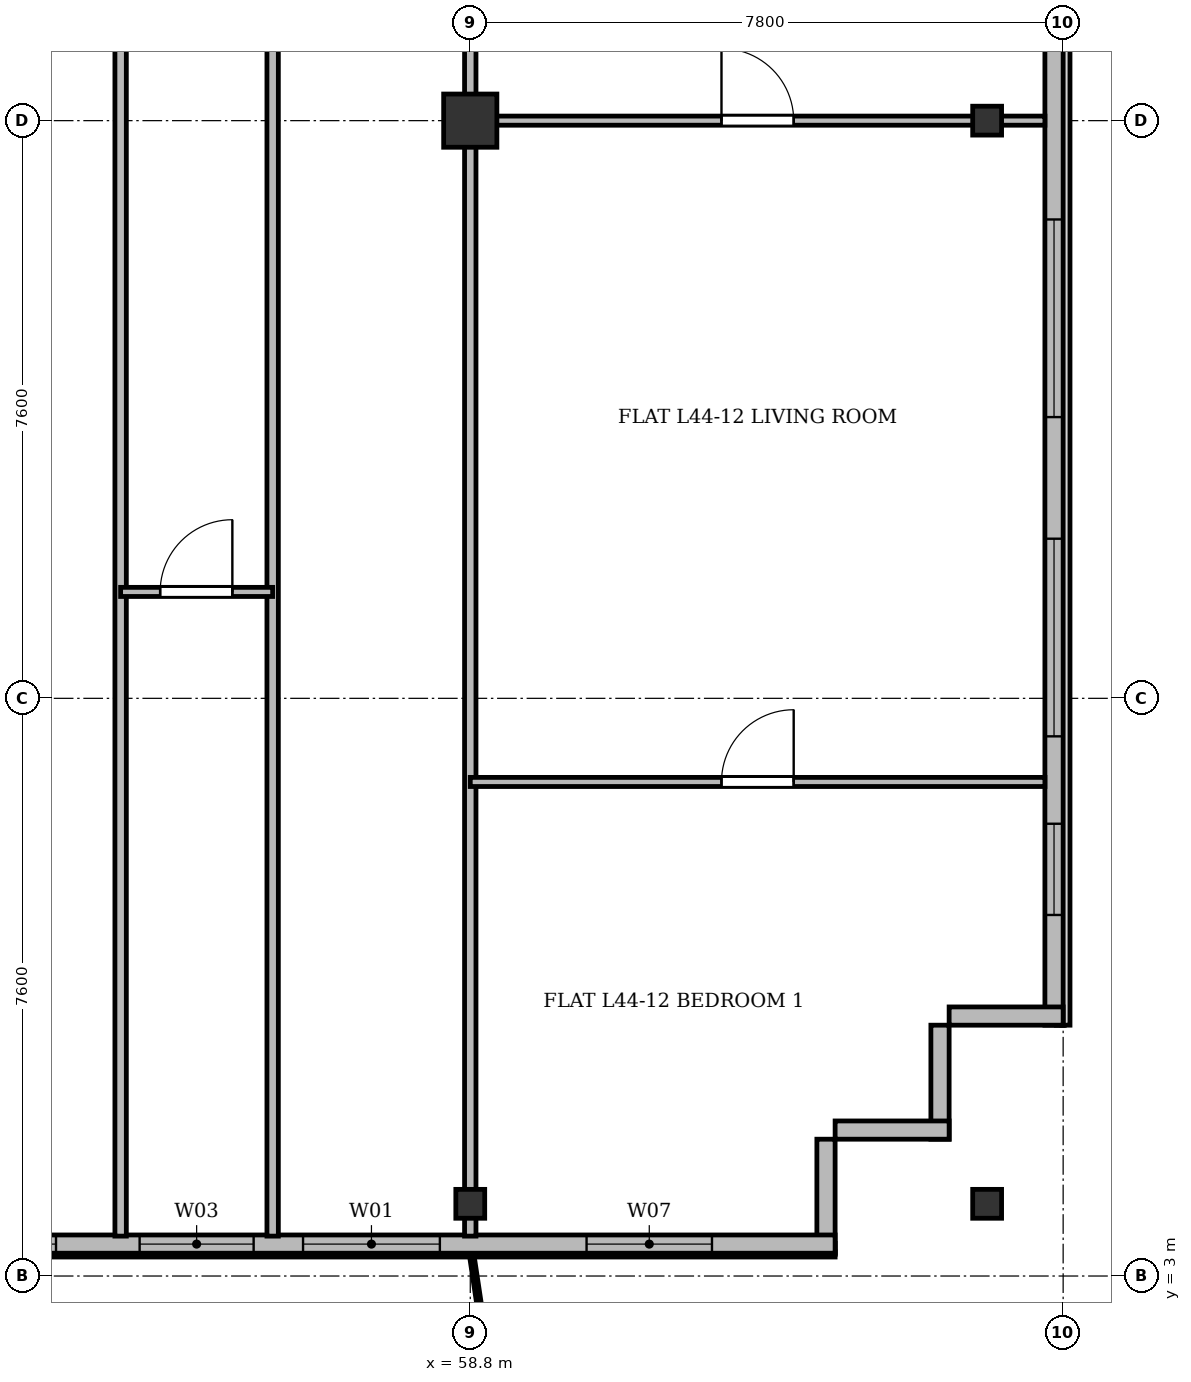
"""IFC4 building model, lengths in metres.
Left out: names, types, materials, properties, quantities, classifications, styles, units other than length and angle.
Written with IfcOpenShell. Run it as: python <this file> out.ifc"""

import sys

from ifc_helpers import new_model, si_unit, direction, frame, frame_2d, origin, origin_2d, place, context, subcontext, project, spatial, rectangle, i_section, extrude, source, transform, mapped, element, fill, save


model = new_model("IFC4")
c1 = context("Model", 3, precision=1e-05, world=origin(), true_north=direction((0.0, 1.0)))
c2 = subcontext(c1, "Body", "Model", "MODEL_VIEW")
j1 = project(units=[si_unit("LENGTHUNIT", "METRE"), si_unit("PLANEANGLEUNIT", "RADIAN")], contexts=[c1])
p1 = place(None, origin())
s1 = spatial("IfcSite", under=j1, at=p1, CompositionType="ELEMENT")
p2 = place(p1, origin())
s2 = spatial("IfcBuilding", under=s1, at=p2, CompositionType="ELEMENT")
p3 = place(p2, frame((0.0, 0.0, 168.1)))
s3 = spatial("IfcBuildingStorey", under=s2, at=p3, CompositionType="ELEMENT", Elevation=168.1)
m1 = source(origin(), c2, "Body", "SweptSolid", [
    extrude(i_section(OverallWidth=0.38, OverallDepth=0.38, WebThickness=0.02, FlangeThickness=0.03, at=origin_2d()), origin(), (0.0, 0.0, 1.0), 3.6),
])
p4 = place(p3, frame((58.8, 3.95, 0.0), z_axis=(0.0, 0.0, 1.0), x_axis=(1.0, 0.0, 0.0)))
e1 = element("IfcColumn", 1, at=p4, inside=s3, PredefinedType="COLUMN", context=c2, shape_type="MappedRepresentation", body=[
    mapped(m1, transform((0.0, 0.0, 0.0), x_axis=(1.0, 0.0, 0.0), y_axis=(0.0, 1.0, 0.0), z_axis=(0.0, 0.0, 1.0), scale=1.0)),
])
m2 = source(origin(), c2, "Body", "SweptSolid", [
    extrude(rectangle(XDim=0.7, YDim=0.7, at=origin_2d()), origin(), (0.0, 0.0, 1.0), 3.6),
])
p5 = place(p3, frame((58.8, 18.2, 0.0), z_axis=(0.0, 0.0, 1.0), x_axis=(1.0, 0.0, 0.0)))
e2 = element("IfcColumn", 2, at=p5, inside=s3, PredefinedType="COLUMN", context=c2, shape_type="MappedRepresentation", body=[
    mapped(m2, transform((0.0, 0.0, 0.0), x_axis=(1.0, 0.0, 0.0), y_axis=(0.0, 1.0, 0.0), z_axis=(0.0, 0.0, 1.0), scale=1.0)),
])
for number, where, z_axis, x_axis in (
    (3, (65.6, 3.95, 0.0), (0.0, 0.0, 1.0), (1.0, 0.0, 0.0)),
    (4, (65.6, 18.2, 0.0), (0.0, 0.0, 1.0), (1.0, 0.0, 0.0)),
):
    element("IfcColumn", number, at=place(p3, frame(where, z_axis=z_axis, x_axis=x_axis)), inside=s3, PredefinedType="COLUMN", context=c2, shape_type="MappedRepresentation", body=[
        mapped(m1, transform((0.0, 0.0, 0.0), x_axis=(1.0, 0.0, 0.0), y_axis=(0.0, 1.0, 0.0), z_axis=(0.0, 0.0, 1.0), scale=1.0)),
    ])
p6 = place(p3, frame((66.48, 45.5, 0.0), z_axis=(0.0, 0.0, 1.0), x_axis=(0.0, -1.0, 0.0)))
e5 = element("IfcWall", 5, at=p6, inside=s3, PredefinedType="SOLIDWALL", context=c2, shape_type="SweptSolid", body=[
    extrude(rectangle(XDim=39.2, YDim=0.24, at=frame_2d((19.6, 0.0))), origin(), (0.0, 0.0, 1.0), 3.35),
])
p7 = place(p6, frame((36.55, 0.0, 0.92)))
e6 = element("IfcOpeningElement", 6, at=p7, cuts=e5, PredefinedType="OPENING", context=c2, shape_type="SweptSolid", body=[
    extrude(rectangle(XDim=1.2, YDim=1.65, at=frame_2d((0.6, 0.825))), frame((0.0, 0.13, 0.0), z_axis=(0.0, -1.0, 0.0), x_axis=(1.0, 0.0, 0.0)), (0.0, 0.0, 1.0), 0.26),
])
p8 = place(p6, frame((32.8, 0.0, 0.92)))
e7 = element("IfcOpeningElement", 7, at=p8, cuts=e5, PredefinedType="OPENING", context=c2, shape_type="SweptSolid", body=[
    extrude(rectangle(XDim=2.6, YDim=1.9, at=frame_2d((1.3, 0.95))), frame((0.0, 0.13, 0.0), z_axis=(0.0, -1.0, 0.0), x_axis=(1.0, 0.0, 0.0)), (0.0, 0.0, 1.0), 0.26),
])
p9 = place(p6, frame((28.6, 0.0, 0.92)))
e8 = element("IfcOpeningElement", 8, at=p9, cuts=e5, PredefinedType="OPENING", context=c2, shape_type="SweptSolid", body=[
    extrude(rectangle(XDim=2.6, YDim=1.9, at=frame_2d((1.3, 0.95))), frame((0.0, 0.13, 0.0), z_axis=(0.0, -1.0, 0.0), x_axis=(1.0, 0.0, 0.0)), (0.0, 0.0, 1.0), 0.26),
])
p10 = place(p6, frame((21.4, 0.0, 0.92)))
e9 = element("IfcOpeningElement", 9, at=p10, cuts=e5, PredefinedType="OPENING", context=c2, shape_type="SweptSolid", body=[
    extrude(rectangle(XDim=2.6, YDim=1.9, at=frame_2d((1.3, 0.95))), frame((0.0, 0.13, 0.0), z_axis=(0.0, -1.0, 0.0), x_axis=(1.0, 0.0, 0.0)), (0.0, 0.0, 1.0), 0.26),
])
p11 = place(p6, frame((7.4, 0.0, 0.92)))
e10 = element("IfcOpeningElement", 10, at=p11, cuts=e5, PredefinedType="OPENING", context=c2, shape_type="SweptSolid", body=[
    extrude(rectangle(XDim=2.6, YDim=1.9, at=frame_2d((1.3, 0.95))), frame((0.0, 0.13, 0.0), z_axis=(0.0, -1.0, 0.0), x_axis=(1.0, 0.0, 0.0)), (0.0, 0.0, 1.0), 0.26),
])
p12 = place(p6, frame((1.15, 0.0, 0.92)))
e11 = element("IfcOpeningElement", 11, at=p12, cuts=e5, PredefinedType="OPENING", context=c2, shape_type="SweptSolid", body=[
    extrude(rectangle(XDim=1.2, YDim=1.65, at=frame_2d((0.6, 0.825))), frame((0.0, 0.13, 0.0), z_axis=(0.0, -1.0, 0.0), x_axis=(1.0, 0.0, 0.0)), (0.0, 0.0, 1.0), 0.26),
])
p13 = place(p3, frame((66.6, 6.42, 0.0), z_axis=(0.0, 0.0, 1.0), x_axis=(-1.0, 0.0, 0.0)))
e12 = element("IfcWall", 12, at=p13, inside=s3, PredefinedType="SOLIDWALL", context=c2, shape_type="SweptSolid", body=[
    extrude(rectangle(XDim=1.5, YDim=0.24, at=frame_2d((0.75, 0.0))), origin(), (0.0, 0.0, 1.0), 2.85),
])
for number, where, z_axis, x_axis in (
    (13, (64.98, 6.3, 0.0), (0.0, 0.0, 1.0), (0.0, -1.0, 0.0)),
    (14, (65.1, 4.92, 0.0), (0.0, 0.0, 1.0), (-1.0, 0.0, 0.0)),
):
    element("IfcWall", number, at=place(p3, frame(where, z_axis=z_axis, x_axis=x_axis)), inside=s3, PredefinedType="SOLIDWALL", context=c2, shape_type="SweptSolid", body=[
        extrude(rectangle(XDim=1.5, YDim=0.24, at=frame_2d((0.75, 0.0))), origin(), (0.0, 0.0, 1.0), 3.35),
    ])
p14 = place(p3, frame((63.48, 4.8, 0.0), z_axis=(0.0, 0.0, 1.0), x_axis=(0.0, -1.0, 0.0)))
e15 = element("IfcWall", 15, at=p14, inside=s3, PredefinedType="SOLIDWALL", context=c2, shape_type="SweptSolid", body=[
    extrude(rectangle(XDim=1.5, YDim=0.24, at=frame_2d((0.75, 0.0))), origin(), (0.0, 0.0, 1.0), 2.75),
])
p15 = place(p3, frame((63.6, 3.42, 0.0), z_axis=(0.0, 0.0, 1.0), x_axis=(-1.0, 0.0, 0.0)))
e16 = element("IfcWall", 16, at=p15, inside=s3, PredefinedType="SOLIDWALL", context=c2, shape_type="SweptSolid", body=[
    extrude(rectangle(XDim=52.8, YDim=0.24, at=frame_2d((26.4, 0.0))), origin(), (0.0, 0.0, 1.0), 3.35),
])
p16 = place(p15, frame((1.62, 0.0, 0.9)))
e17 = element("IfcOpeningElement", 17, at=p16, cuts=e16, PredefinedType="OPENING", context=c2, shape_type="SweptSolid", body=[
    extrude(rectangle(XDim=1.65, YDim=1.85, at=frame_2d((0.825, 0.925))), frame((0.0, 0.13, 0.0), z_axis=(0.0, -1.0, 0.0), x_axis=(1.0, 0.0, 0.0)), (0.0, 0.0, 1.0), 0.26),
])
p17 = place(p15, frame((5.2, 0.0, 0.9)))
e18 = element("IfcOpeningElement", 18, at=p17, cuts=e16, PredefinedType="OPENING", context=c2, shape_type="SweptSolid", body=[
    extrude(rectangle(XDim=1.8, YDim=1.8, at=frame_2d((0.9, 0.9))), frame((0.0, 0.13, 0.0), z_axis=(0.0, -1.0, 0.0), x_axis=(1.0, 0.0, 0.0)), (0.0, 0.0, 1.0), 0.26),
])
p18 = place(p15, frame((7.65, 0.0, 0.9)))
e19 = element("IfcOpeningElement", 19, at=p18, cuts=e16, PredefinedType="OPENING", context=c2, shape_type="SweptSolid", body=[
    extrude(rectangle(XDim=1.5, YDim=1.75, at=frame_2d((0.75, 0.875))), frame((0.0, 0.13, 0.0), z_axis=(0.0, -1.0, 0.0), x_axis=(1.0, 0.0, 0.0)), (0.0, 0.0, 1.0), 0.26),
])
p19 = place(p15, frame((10.25, 0.0, 0.9)))
e20 = element("IfcOpeningElement", 20, at=p19, cuts=e16, PredefinedType="OPENING", context=c2, shape_type="SweptSolid", body=[
    extrude(rectangle(XDim=1.5, YDim=1.75, at=frame_2d((0.75, 0.875))), frame((0.0, 0.13, 0.0), z_axis=(0.0, -1.0, 0.0), x_axis=(1.0, 0.0, 0.0)), (0.0, 0.0, 1.0), 0.26),
])
p20 = place(p15, frame((13.62, 0.0, 0.0)))
e21 = element("IfcOpeningElement", 21, at=p20, cuts=e16, PredefinedType="OPENING", context=c2, shape_type="SweptSolid", body=[
    extrude(rectangle(XDim=1.2, YDim=2.2, at=frame_2d((0.6, 1.1))), frame((0.0, 0.13, 0.0), z_axis=(0.0, -1.0, 0.0), x_axis=(1.0, 0.0, 0.0)), (0.0, 0.0, 1.0), 0.26),
])
p21 = place(p15, frame((15.375, 0.0, 0.9)))
e22 = element("IfcOpeningElement", 22, at=p21, cuts=e16, PredefinedType="OPENING", context=c2, shape_type="SweptSolid", body=[
    extrude(rectangle(XDim=1.65, YDim=1.85, at=frame_2d((0.825, 0.925))), frame((0.0, 0.13, 0.0), z_axis=(0.0, -1.0, 0.0), x_axis=(1.0, 0.0, 0.0)), (0.0, 0.0, 1.0), 0.26),
])
p22 = place(p15, frame((17.7, 0.0, 0.9)))
e23 = element("IfcOpeningElement", 23, at=p22, cuts=e16, PredefinedType="OPENING", context=c2, shape_type="SweptSolid", body=[
    extrude(rectangle(XDim=1.8, YDim=1.8, at=frame_2d((0.9, 0.9))), frame((0.0, 0.13, 0.0), z_axis=(0.0, -1.0, 0.0), x_axis=(1.0, 0.0, 0.0)), (0.0, 0.0, 1.0), 0.26),
])
p23 = place(p15, frame((22.0, 0.0, 0.9)))
e24 = element("IfcOpeningElement", 24, at=p23, cuts=e16, PredefinedType="OPENING", context=c2, shape_type="SweptSolid", body=[
    extrude(rectangle(XDim=2.2, YDim=1.8, at=frame_2d((1.1, 0.9))), frame((0.0, 0.13, 0.0), z_axis=(0.0, -1.0, 0.0), x_axis=(1.0, 0.0, 0.0)), (0.0, 0.0, 1.0), 0.26),
])
p24 = place(p15, frame((28.95, 0.0, 0.9)))
e25 = element("IfcOpeningElement", 25, at=p24, cuts=e16, PredefinedType="OPENING", context=c2, shape_type="SweptSolid", body=[
    extrude(rectangle(XDim=1.5, YDim=1.75, at=frame_2d((0.75, 0.875))), frame((0.0, 0.13, 0.0), z_axis=(0.0, -1.0, 0.0), x_axis=(1.0, 0.0, 0.0)), (0.0, 0.0, 1.0), 0.26),
])
p25 = place(p15, frame((35.6, 0.0, 0.9)))
e26 = element("IfcOpeningElement", 26, at=p25, cuts=e16, PredefinedType="OPENING", context=c2, shape_type="SweptSolid", body=[
    extrude(rectangle(XDim=2.0, YDim=1.95, at=frame_2d((1.0, 0.975))), frame((0.0, 0.13, 0.0), z_axis=(0.0, -1.0, 0.0), x_axis=(1.0, 0.0, 0.0)), (0.0, 0.0, 1.0), 0.26),
])
p26 = place(p15, frame((41.656, 0.0, 0.0)))
e27 = element("IfcOpeningElement", 27, at=p26, cuts=e16, PredefinedType="OPENING", context=c2, shape_type="SweptSolid", body=[
    extrude(rectangle(XDim=1.2, YDim=2.2, at=frame_2d((0.6, 1.1))), frame((0.0, 0.13, 0.0), z_axis=(0.0, -1.0, 0.0), x_axis=(1.0, 0.0, 0.0)), (0.0, 0.0, 1.0), 0.26),
])
p27 = place(p15, frame((43.65, 0.0, 0.9)))
e28 = element("IfcOpeningElement", 28, at=p27, cuts=e16, PredefinedType="OPENING", context=c2, shape_type="SweptSolid", body=[
    extrude(rectangle(XDim=1.5, YDim=1.75, at=frame_2d((0.75, 0.875))), frame((0.0, 0.13, 0.0), z_axis=(0.0, -1.0, 0.0), x_axis=(1.0, 0.0, 0.0)), (0.0, 0.0, 1.0), 0.26),
])
p28 = place(p15, frame((45.95, 0.0, 0.9)))
e29 = element("IfcOpeningElement", 29, at=p28, cuts=e16, PredefinedType="OPENING", context=c2, shape_type="SweptSolid", body=[
    extrude(rectangle(XDim=1.5, YDim=1.75, at=frame_2d((0.75, 0.875))), frame((0.0, 0.13, 0.0), z_axis=(0.0, -1.0, 0.0), x_axis=(1.0, 0.0, 0.0)), (0.0, 0.0, 1.0), 0.26),
])
p29 = place(p15, frame((49.605, 0.0, 0.9)))
e30 = element("IfcOpeningElement", 30, at=p29, cuts=e16, PredefinedType="OPENING", context=c2, shape_type="SweptSolid", body=[
    extrude(rectangle(XDim=1.5, YDim=1.75, at=frame_2d((0.75, 0.875))), frame((0.0, 0.13, 0.0), z_axis=(0.0, -1.0, 0.0), x_axis=(1.0, 0.0, 0.0)), (0.0, 0.0, 1.0), 0.26),
])
p30 = place(p3, frame((58.8, 3.525, 0.0), z_axis=(0.0, 0.0, 1.0), x_axis=(0.0, 1.0, 0.0)))
e31 = element("IfcWall", 31, at=p30, inside=s3, PredefinedType="PARTITIONING", context=c2, shape_type="SweptSolid", body=[
    extrude(rectangle(XDim=27.275, YDim=0.15, at=frame_2d((13.638, 0.0))), origin(), (0.0, 0.0, 1.0), 2.85),
])
for number, where, z_axis, x_axis in (
    (32, (54.2, 3.525, 0.0), (0.0, 0.0, 1.0), (0.0, 1.0, 0.0)),
    (33, (56.2, 3.525, 0.0), (0.0, 0.0, 1.0), (0.0, 1.0, 0.0)),
):
    element("IfcWall", number, at=place(p3, frame(where, z_axis=z_axis, x_axis=x_axis)), inside=s3, PredefinedType="PARTITIONING", context=c2, shape_type="SweptSolid", body=[
        extrude(rectangle(XDim=27.275, YDim=0.15, at=frame_2d((13.638, 0.0))), origin(), (0.0, 0.0, 1.0), 2.75),
    ])
p31 = place(p3, frame((54.2, 12.0, 0.0), z_axis=(0.0, 0.0, 1.0), x_axis=(1.0, 0.0, 0.0)))
e34 = element("IfcWall", 34, at=p31, inside=s3, PredefinedType="PARTITIONING", context=c2, shape_type="SweptSolid", body=[
    extrude(rectangle(XDim=2.0, YDim=0.12, at=frame_2d((1.0, 0.0))), origin(), (0.0, 0.0, 1.0), 3.35),
])
p32 = place(p31, frame((0.52, 0.0, 0.0)))
e35 = element("IfcOpeningElement", 35, at=p32, cuts=e34, PredefinedType="OPENING", context=c2, shape_type="SweptSolid", body=[
    extrude(rectangle(XDim=0.95, YDim=2.15, at=frame_2d((0.475, 1.075))), frame((0.0, 0.07, 0.0), z_axis=(0.0, -1.0, 0.0), x_axis=(1.0, 0.0, 0.0)), (0.0, 0.0, 1.0), 0.14),
])
p33 = place(p3, frame((58.8, 18.2, 0.0), z_axis=(0.0, 0.0, 1.0), x_axis=(1.0, 0.0, 0.0)))
e36 = element("IfcWall", 36, at=p33, inside=s3, PredefinedType="PARTITIONING", context=c2, shape_type="SweptSolid", body=[
    extrude(rectangle(XDim=7.56, YDim=0.12, at=frame_2d((3.78, 0.0))), origin(), (0.0, 0.0, 1.0), 2.75),
])
p34 = place(p33, frame((3.305, 0.0, 0.0)))
e37 = element("IfcOpeningElement", 37, at=p34, cuts=e36, PredefinedType="OPENING", context=c2, shape_type="SweptSolid", body=[
    extrude(rectangle(XDim=0.95, YDim=2.15, at=frame_2d((0.475, 1.075))), frame((0.0, 0.07, 0.0), z_axis=(0.0, -1.0, 0.0), x_axis=(1.0, 0.0, 0.0)), (0.0, 0.0, 1.0), 0.14),
])
p35 = place(p3, frame((58.8, 9.5, 0.0), z_axis=(0.0, 0.0, 1.0), x_axis=(1.0, 0.0, 0.0)))
e38 = element("IfcWall", 38, at=p35, inside=s3, PredefinedType="PARTITIONING", context=c2, shape_type="SweptSolid", body=[
    extrude(rectangle(XDim=7.56, YDim=0.12, at=frame_2d((3.78, 0.0))), origin(), (0.0, 0.0, 1.0), 2.85),
])
p36 = place(p35, frame((3.305, 0.0, 0.0)))
e39 = element("IfcOpeningElement", 39, at=p36, cuts=e38, PredefinedType="OPENING", context=c2, shape_type="SweptSolid", body=[
    extrude(rectangle(XDim=0.95, YDim=2.15, at=frame_2d((0.475, 1.075))), frame((0.0, 0.07, 0.0), z_axis=(0.0, -1.0, 0.0), x_axis=(1.0, 0.0, 0.0)), (0.0, 0.0, 1.0), 0.14),
])
m3 = source(origin(), c2, "Body", "SweptSolid", [
    extrude(rectangle(XDim=1.2, YDim=1.65, at=frame_2d((0.6, 0.825))), frame((0.0, 0.03, 0.0), z_axis=(0.0, -1.0, 0.0), x_axis=(1.0, 0.0, 0.0)), (0.0, 0.0, 1.0), 0.06),
])
p37 = place(p7, origin())
e40 = element("IfcWindow", 40, at=p37, inside=s3, PartitioningType="SINGLE_PANEL", PredefinedType="WINDOW", context=c2, shape_type="MappedRepresentation", body=[
    mapped(m3, transform((0.0, 0.0, 0.0), x_axis=(1.0, 0.0, 0.0), y_axis=(0.0, 1.0, 0.0), z_axis=(0.0, 0.0, 1.0), scale=1.0)),
])
fill(e6, e40)
m4 = source(origin(), c2, "Body", "SweptSolid", [
    extrude(rectangle(XDim=2.6, YDim=1.9, at=frame_2d((1.3, 0.95))), frame((0.0, 0.03, 0.0), z_axis=(0.0, -1.0, 0.0), x_axis=(1.0, 0.0, 0.0)), (0.0, 0.0, 1.0), 0.06),
])
p38 = place(p8, origin())
e41 = element("IfcWindow", 41, at=p38, inside=s3, PartitioningType="SINGLE_PANEL", PredefinedType="WINDOW", context=c2, shape_type="MappedRepresentation", body=[
    mapped(m4, transform((0.0, 0.0, 0.0), x_axis=(1.0, 0.0, 0.0), y_axis=(0.0, 1.0, 0.0), z_axis=(0.0, 0.0, 1.0), scale=1.0)),
])
fill(e7, e41)
p39 = place(p9, origin())
e42 = element("IfcWindow", 42, at=p39, inside=s3, PartitioningType="SINGLE_PANEL", PredefinedType="WINDOW", context=c2, shape_type="MappedRepresentation", body=[
    mapped(m4, transform((0.0, 0.0, 0.0), x_axis=(1.0, 0.0, 0.0), y_axis=(0.0, 1.0, 0.0), z_axis=(0.0, 0.0, 1.0), scale=1.0)),
])
fill(e8, e42)
m5 = source(origin(), c2, "Body", "SweptSolid", [
    extrude(rectangle(XDim=1.65, YDim=1.85, at=frame_2d((0.825, 0.925))), frame((0.0, 0.03, 0.0), z_axis=(0.0, -1.0, 0.0), x_axis=(1.0, 0.0, 0.0)), (0.0, 0.0, 1.0), 0.06),
])
p40 = place(p16, origin())
e43 = element("IfcWindow", 43, at=p40, inside=s3, PartitioningType="SINGLE_PANEL", PredefinedType="WINDOW", context=c2, shape_type="MappedRepresentation", body=[
    mapped(m5, transform((0.0, 0.0, 0.0), x_axis=(1.0, 0.0, 0.0), y_axis=(0.0, 1.0, 0.0), z_axis=(0.0, 0.0, 1.0), scale=1.0)),
])
fill(e17, e43)
m6 = source(origin(), c2, "Body", "SweptSolid", [
    extrude(rectangle(XDim=1.8, YDim=1.8, at=frame_2d((0.9, 0.9))), frame((0.0, 0.03, 0.0), z_axis=(0.0, -1.0, 0.0), x_axis=(1.0, 0.0, 0.0)), (0.0, 0.0, 1.0), 0.06),
])
p41 = place(p17, origin())
e44 = element("IfcWindow", 44, at=p41, inside=s3, PartitioningType="SINGLE_PANEL", PredefinedType="WINDOW", context=c2, shape_type="MappedRepresentation", body=[
    mapped(m6, transform((0.0, 0.0, 0.0), x_axis=(1.0, 0.0, 0.0), y_axis=(0.0, 1.0, 0.0), z_axis=(0.0, 0.0, 1.0), scale=1.0)),
])
fill(e18, e44)
m7 = source(origin(), c2, "Body", "SweptSolid", [
    extrude(rectangle(XDim=1.5, YDim=1.75, at=frame_2d((0.75, 0.875))), frame((0.0, 0.03, 0.0), z_axis=(0.0, -1.0, 0.0), x_axis=(1.0, 0.0, 0.0)), (0.0, 0.0, 1.0), 0.06),
])
p42 = place(p18, origin())
e45 = element("IfcWindow", 45, at=p42, inside=s3, PartitioningType="SINGLE_PANEL", PredefinedType="WINDOW", context=c2, shape_type="MappedRepresentation", body=[
    mapped(m7, transform((0.0, 0.0, 0.0), x_axis=(1.0, 0.0, 0.0), y_axis=(0.0, 1.0, 0.0), z_axis=(0.0, 0.0, 1.0), scale=1.0)),
])
fill(e19, e45)
p43 = place(p19, origin())
e46 = element("IfcWindow", 46, at=p43, inside=s3, PartitioningType="SINGLE_PANEL", PredefinedType="WINDOW", context=c2, shape_type="MappedRepresentation", body=[
    mapped(m7, transform((0.0, 0.0, 0.0), x_axis=(1.0, 0.0, 0.0), y_axis=(0.0, 1.0, 0.0), z_axis=(0.0, 0.0, 1.0), scale=1.0)),
])
fill(e20, e46)
m8 = source(origin(), c2, "Body", "SweptSolid", [
    extrude(rectangle(XDim=0.95, YDim=2.15, at=frame_2d((0.475, 1.075))), frame((0.0, 0.025, 0.0), z_axis=(0.0, -1.0, 0.0), x_axis=(1.0, 0.0, 0.0)), (0.0, 0.0, 1.0), 0.05),
])
p44 = place(p32, origin())
e47 = element("IfcDoor", 47, at=p44, inside=s3, OperationType="SINGLE_SWING_RIGHT", PredefinedType="DOOR", context=c2, shape_type="MappedRepresentation", body=[
    mapped(m8, transform((0.0, 0.0, 0.0), x_axis=(1.0, 0.0, 0.0), y_axis=(0.0, 1.0, 0.0), z_axis=(0.0, 0.0, 1.0), scale=1.0)),
])
fill(e35, e47)
p45 = place(p34, origin())
e48 = element("IfcDoor", 48, at=p45, inside=s3, OperationType="SINGLE_SWING_LEFT", PredefinedType="DOOR", context=c2, shape_type="MappedRepresentation", body=[
    mapped(m8, transform((0.0, 0.0, 0.0), x_axis=(1.0, 0.0, 0.0), y_axis=(0.0, 1.0, 0.0), z_axis=(0.0, 0.0, 1.0), scale=1.0)),
])
fill(e37, e48)
p46 = place(p36, origin())
e49 = element("IfcDoor", 49, at=p46, inside=s3, OperationType="SINGLE_SWING_RIGHT", PredefinedType="DOOR", context=c2, shape_type="MappedRepresentation", body=[
    mapped(m8, transform((0.0, 0.0, 0.0), x_axis=(1.0, 0.0, 0.0), y_axis=(0.0, 1.0, 0.0), z_axis=(0.0, 0.0, 1.0), scale=1.0)),
])
fill(e39, e49)
save(model, sys.argv[1])
